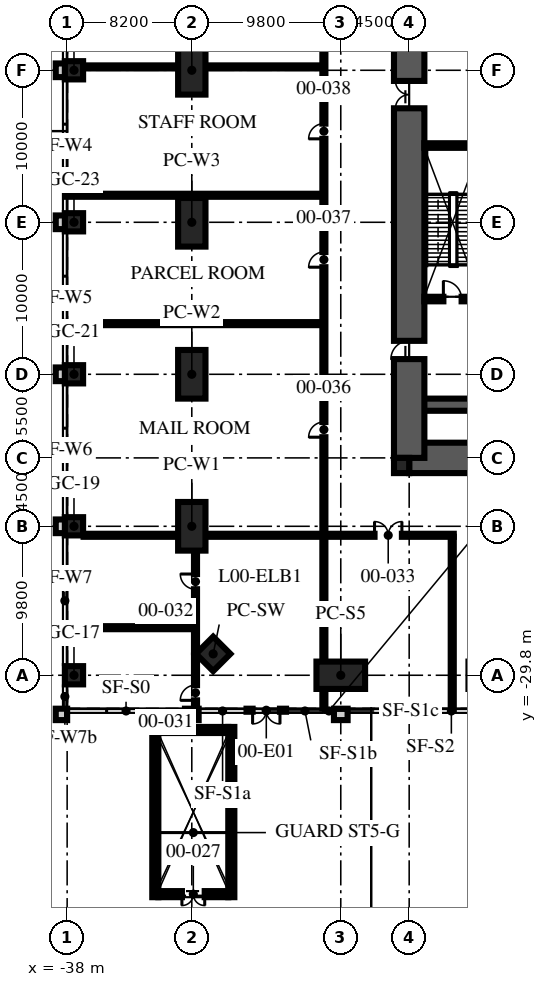
"""IFC4 building model, lengths in metres.
Left out: names, types, materials, properties, quantities, classifications, styles, units other than length and angle.
Written with IfcOpenShell. Run it as: python <this file> out.ifc"""

import sys

from ifc_helpers import new_model, si_unit, direction, frame, frame_2d, origin, origin_2d, place, context, subcontext, project, spatial, rectangle, hollow_rectangle, extrude, element, fill, save


model = new_model("IFC4")
c1 = context("Model", 3, precision=1e-05, world=origin(), true_north=direction((0.0, 1.0)))
c2 = subcontext(c1, "Body", "Model", "MODEL_VIEW")
j1 = project(units=[si_unit("LENGTHUNIT", "METRE"), si_unit("PLANEANGLEUNIT", "RADIAN")], contexts=[c1])
p1 = place(None, origin())
s1 = spatial("IfcSite", under=j1, at=p1, CompositionType="ELEMENT")
p2 = place(p1, origin())
s2 = spatial("IfcBuilding", under=s1, at=p2, CompositionType="ELEMENT")
p3 = place(p2, origin())
s3 = spatial("IfcBuildingStorey", under=s2, at=p3, CompositionType="ELEMENT", Elevation=0.0)
p4 = place(p3, frame((-15.5, -15.5, -0.3), z_axis=(0.0, 0.0, 1.0), x_axis=(1.0, 0.0, 0.0)))
e1 = element("IfcWall", 1, at=p4, inside=s3, PredefinedType="SHEAR", context=c2, shape_type="SweptSolid", body=[
    extrude(rectangle(XDim=31.0, YDim=2.0, at=frame_2d((15.5, 0.0))), origin(), (0.0, 0.0, 1.0), 6.0),
])
p5 = place(p4, frame((10.4, 0.0, 0.3)))
e2 = element("IfcOpeningElement", 2, at=p5, cuts=e1, PredefinedType="OPENING", context=c2, shape_type="SweptSolid", body=[
    extrude(rectangle(XDim=1.1, YDim=2.1, at=frame_2d((0.55, 1.05))), frame((0.0, 1.01, 0.0), z_axis=(0.0, -1.0, 0.0), x_axis=(1.0, 0.0, 0.0)), (0.0, 0.0, 1.0), 2.02),
])
p6 = place(p4, frame((13.5, 0.0, 0.3)))
e3 = element("IfcOpeningElement", 3, at=p6, cuts=e1, PredefinedType="OPENING", context=c2, shape_type="SweptSolid", body=[
    extrude(rectangle(XDim=1.1, YDim=2.1, at=frame_2d((0.55, 1.05))), frame((0.0, 1.01, 0.0), z_axis=(0.0, -1.0, 0.0), x_axis=(1.0, 0.0, 0.0)), (0.0, 0.0, 1.0), 2.02),
])
p7 = place(p4, frame((16.6, 0.0, 0.3)))
e4 = element("IfcOpeningElement", 4, at=p7, cuts=e1, PredefinedType="OPENING", context=c2, shape_type="SweptSolid", body=[
    extrude(rectangle(XDim=1.1, YDim=2.1, at=frame_2d((0.55, 1.05))), frame((0.0, 1.01, 0.0), z_axis=(0.0, -1.0, 0.0), x_axis=(1.0, 0.0, 0.0)), (0.0, 0.0, 1.0), 2.02),
])
p8 = place(p3, frame((-15.5, -12.0, -0.3), z_axis=(0.0, 0.0, 1.0), x_axis=(1.0, 0.0, 0.0)))
e5 = element("IfcWall", 5, at=p8, inside=s3, PredefinedType="SHEAR", context=c2, shape_type="SweptSolid", body=[
    extrude(rectangle(XDim=31.0, YDim=0.8, at=frame_2d((15.5, 0.0))), origin(), (0.0, 0.0, 1.0), 6.0),
])
p9 = place(p3, frame((-15.5, -15.5, -0.3), z_axis=(0.0, 0.0, 1.0), x_axis=(0.0, 1.0, 0.0)))
e6 = element("IfcWall", 6, at=p9, inside=s3, PredefinedType="SHEAR", context=c2, shape_type="SweptSolid", body=[
    extrude(rectangle(XDim=31.0, YDim=2.0, at=frame_2d((15.5, 0.0))), origin(), (0.0, 0.0, 1.0), 6.0),
])
p10 = place(p9, frame((6.5, 0.0, 0.3)))
e7 = element("IfcOpeningElement", 7, at=p10, cuts=e6, PredefinedType="OPENING", context=c2, shape_type="SweptSolid", body=[
    extrude(rectangle(XDim=1.2, YDim=2.1, at=frame_2d((0.6, 1.05))), frame((0.0, 1.01, 0.0), z_axis=(0.0, -1.0, 0.0), x_axis=(1.0, 0.0, 0.0)), (0.0, 0.0, 1.0), 2.02),
])
p11 = place(p9, frame((23.0, 0.0, 0.3)))
e8 = element("IfcOpeningElement", 8, at=p11, cuts=e6, PredefinedType="OPENING", context=c2, shape_type="SweptSolid", body=[
    extrude(rectangle(XDim=1.8, YDim=2.1, at=frame_2d((0.9, 1.05))), frame((0.0, 1.01, 0.0), z_axis=(0.0, -1.0, 0.0), x_axis=(1.0, 0.0, 0.0)), (0.0, 0.0, 1.0), 2.02),
])
p12 = place(p3, frame((-16.0, -16.0, -0.3), z_axis=(0.0, 0.0, 1.0), x_axis=(1.0, 0.0, 0.0)))
e9 = element("IfcColumn", 9, at=p12, inside=s3, PredefinedType="COLUMN", context=c2, shape_type="SweptSolid", body=[
    extrude(rectangle(XDim=1.0, YDim=1.0, at=origin_2d()), origin(), (0.0, 0.0, 1.0), 6.0),
])
for number, where, z_axis, x_axis in (
    (10, (-20.0, -29.8, 0.0), (0.0, 0.0, 1.0), (1.0, 0.0, 0.0)),
    (11, (-29.8, -20.0, 0.0), (0.0, 0.0, 1.0), (0.0, 1.0, 0.0)),
    (12, (-29.8, -10.0, 0.0), (0.0, 0.0, 1.0), (0.0, 1.0, 0.0)),
    (13, (-29.8, 0.0, 0.0), (0.0, 0.0, 1.0), (0.0, 1.0, 0.0)),
    (14, (-29.8, 10.0, 0.0), (0.0, 0.0, 1.0), (0.0, 1.0, 0.0)),
):
    element("IfcColumn", number, at=place(p3, frame(where, z_axis=z_axis, x_axis=x_axis)), inside=s3, PredefinedType="COLUMN", context=c2, shape_type="SweptSolid", body=[
        extrude(hollow_rectangle(XDim=3.2, YDim=1.8, WallThickness=0.2, at=origin_2d()), origin(), (0.0, 0.0, 1.0), 6.0),
    ])
p13 = place(p3, frame((-28.394, -28.394, 0.0), z_axis=(0.0, 0.0, 1.0), x_axis=(0.707106781187, -0.707106781187, 0.0)))
e15 = element("IfcColumn", 15, at=p13, inside=s3, PredefinedType="COLUMN", context=c2, shape_type="SweptSolid", body=[
    extrude(hollow_rectangle(XDim=1.6, YDim=1.6, WallThickness=0.1, at=origin_2d()), origin(), (0.0, 0.0, 1.0), 6.0),
])
for number, where, z_axis, x_axis in (
    (16, (-37.55, -29.8, 0.0), (0.0, 0.0, 1.0), (1.0, 0.0, 0.0)),
    (17, (-37.55, -20.0, 0.0), (0.0, 0.0, 1.0), (1.0, 0.0, 0.0)),
    (18, (-37.55, -10.0, 0.0), (0.0, 0.0, 1.0), (1.0, 0.0, 0.0)),
    (19, (-37.55, 0.0, 0.0), (0.0, 0.0, 1.0), (1.0, 0.0, 0.0)),
    (20, (-37.55, 10.0, 0.0), (0.0, 0.0, 1.0), (1.0, 0.0, 0.0)),
):
    element("IfcColumn", number, at=place(p3, frame(where, z_axis=z_axis, x_axis=x_axis)), inside=s3, PredefinedType="COLUMN", context=c2, shape_type="SweptSolid", body=[
        extrude(rectangle(XDim=1.2, YDim=1.2, at=origin_2d()), origin(), (0.0, 0.0, 1.0), 6.0),
    ])
for number, where, z_axis, x_axis in (
    (21, (-30.25, -32.375, -0.2), (0.0, 0.0, 1.0), (1.0, 0.0, 0.0)),
    (22, (-20.45, -32.375, -0.2), (0.0, 0.0, 1.0), (1.0, 0.0, 0.0)),
):
    element("IfcWall", number, at=place(p3, frame(where, z_axis=z_axis, x_axis=x_axis)), inside=s3, PredefinedType="SOLIDWALL", context=c2, shape_type="SweptSolid", body=[
        extrude(rectangle(XDim=0.9, YDim=0.75, at=frame_2d((0.45, 0.0))), origin(), (0.0, 0.0, 1.0), 6.2),
    ])
p14 = place(p3, frame((-26.2, -32.1, 0.0), z_axis=(0.0, 0.0, 1.0), x_axis=(1.0, 0.0, 0.0)))
e23 = element("IfcWall", 23, at=p14, inside=s3, PredefinedType="ELEMENTEDWALL", context=c2, shape_type="SweptSolid", body=[
    extrude(rectangle(XDim=2.6, YDim=0.2, at=frame_2d((1.3, 0.0))), origin(), (0.0, 0.0, 1.0), 3.2),
])
p15 = place(p14, frame((2.2, 0.0, 0.0), z_axis=(0.0, 0.0, 1.0), x_axis=(-1.0, 0.0, 0.0)))
e24 = element("IfcOpeningElement", 24, at=p15, cuts=e23, PredefinedType="OPENING", context=c2, shape_type="SweptSolid", body=[
    extrude(rectangle(XDim=1.8, YDim=2.7, at=frame_2d((0.9, 1.35))), frame((0.0, 0.11, 0.0), z_axis=(0.0, -1.0, 0.0), x_axis=(1.0, 0.0, 0.0)), (0.0, 0.0, 1.0), 0.22),
])
for number, where, z_axis, x_axis in (
    (25, (-38.375, 10.45, -0.2), (0.0, 0.0, 1.0), (0.0, -1.0, 0.0)),
    (26, (-38.375, 0.45, -0.2), (0.0, 0.0, 1.0), (0.0, -1.0, 0.0)),
    (27, (-38.375, -9.55, -0.2), (0.0, 0.0, 1.0), (0.0, -1.0, 0.0)),
    (28, (-38.375, -19.55, -0.2), (0.0, 0.0, 1.0), (0.0, -1.0, 0.0)),
):
    element("IfcWall", number, at=place(p3, frame(where, z_axis=z_axis, x_axis=x_axis)), inside=s3, PredefinedType="SOLIDWALL", context=c2, shape_type="SweptSolid", body=[
        extrude(rectangle(XDim=0.9, YDim=0.75, at=frame_2d((0.45, 0.0))), origin(), (0.0, 0.0, 1.0), 6.2),
    ])
p16 = place(p3, frame((-38.375, -32.0, -0.2), z_axis=(0.0, 0.0, 1.0), x_axis=(0.0, -1.0, 0.0)))
e29 = element("IfcWall", 29, at=p16, inside=s3, PredefinedType="SOLIDWALL", context=c2, shape_type="SweptSolid", body=[
    extrude(rectangle(XDim=0.75, YDim=0.75, at=frame_2d((0.375, 0.0))), origin(), (0.0, 0.0, 1.0), 6.2),
])
p17 = place(p3, frame((-14.5, -5.05, 0.0), z_axis=(0.0, 0.0, 1.0), x_axis=(1.0, 0.0, 0.0)))
e30 = element("IfcWall", 30, at=p17, inside=s3, PredefinedType="SOLIDWALL", context=c2, shape_type="SweptSolid", body=[
    extrude(rectangle(XDim=5.7, YDim=0.3, at=frame_2d((2.85, 0.0))), origin(), (0.0, 0.0, 1.0), 5.7),
])
p18 = place(p17, frame((1.25, 0.0, 0.0)))
e31 = element("IfcOpeningElement", 31, at=p18, cuts=e30, PredefinedType="OPENING", context=c2, shape_type="SweptSolid", body=[
    extrude(rectangle(XDim=1.2, YDim=2.1, at=frame_2d((0.6, 1.05))), frame((0.0, 0.16, 0.0), z_axis=(0.0, -1.0, 0.0), x_axis=(1.0, 0.0, 0.0)), (0.0, 0.0, 1.0), 0.32),
])
p19 = place(p3, frame((-14.5, 5.05, 0.0), z_axis=(0.0, 0.0, 1.0), x_axis=(1.0, 0.0, 0.0)))
e32 = element("IfcWall", 32, at=p19, inside=s3, PredefinedType="SOLIDWALL", context=c2, shape_type="SweptSolid", body=[
    extrude(rectangle(XDim=3.7, YDim=0.3, at=frame_2d((1.85, 0.0))), origin(), (0.0, 0.0, 1.0), 5.7),
])
for number, where, z_axis, x_axis in (
    (33, (-32.2, -44.4, -0.6), (0.0, 0.0, 1.0), (0.0, 1.0, 0.0)),
    (34, (-27.2, -44.4, -0.6), (0.0, 0.0, 1.0), (0.0, 1.0, 0.0)),
):
    element("IfcWall", number, at=place(p3, frame(where, z_axis=z_axis, x_axis=x_axis)), inside=s3, PredefinedType="SOLIDWALL", context=c2, shape_type="SweptSolid", body=[
        extrude(rectangle(XDim=11.2, YDim=0.4, at=frame_2d((5.6, 0.0))), origin(), (0.0, 0.0, 1.0), 3.8),
    ])
p20 = place(p3, frame((-32.0, -44.2, -0.6), z_axis=(0.0, 0.0, 1.0), x_axis=(1.0, 0.0, 0.0)))
e35 = element("IfcWall", 35, at=p20, inside=s3, PredefinedType="SOLIDWALL", context=c2, shape_type="SweptSolid", body=[
    extrude(rectangle(XDim=4.6, YDim=0.4, at=frame_2d((2.3, 0.0))), origin(), (0.0, 0.0, 1.0), 3.8),
])
p21 = place(p20, frame((3.05, 0.0, 0.6), z_axis=(0.0, 0.0, 1.0), x_axis=(-1.0, 0.0, 0.0)))
e36 = element("IfcOpeningElement", 36, at=p21, cuts=e35, PredefinedType="OPENING", context=c2, shape_type="SweptSolid", body=[
    extrude(rectangle(XDim=1.5, YDim=2.1, at=frame_2d((0.75, 1.05))), frame((0.0, 0.21, 0.0), z_axis=(0.0, -1.0, 0.0), x_axis=(1.0, 0.0, 0.0)), (0.0, 0.0, 1.0), 0.42),
])
p22 = place(p3, frame((-32.0, -33.4, -0.6), z_axis=(0.0, 0.0, 1.0), x_axis=(1.0, 0.0, 0.0)))
e37 = element("IfcWall", 37, at=p22, inside=s3, PredefinedType="SOLIDWALL", context=c2, shape_type="SweptSolid", body=[
    extrude(rectangle(XDim=4.6, YDim=0.4, at=frame_2d((2.3, 0.0))), origin(), (0.0, 0.0, 1.0), 3.8),
])
p23 = place(p3, frame((-12.667, -32.075, 0.0), z_axis=(0.0, 0.0, 1.0), x_axis=(0.0, 1.0, 0.0)))
e38 = element("IfcWall", 38, at=p23, inside=s3, PredefinedType="SOLIDWALL", context=c2, shape_type="SweptSolid", body=[
    extrude(rectangle(XDim=11.384, YDim=0.2, at=frame_2d((5.692, 0.0))), origin(), (0.0, 0.0, 1.0), 4.7),
])
p24 = place(p3, frame((-29.556, -31.98, 0.0), z_axis=(0.0, 0.0, 1.0), x_axis=(0.0, 1.0, 0.0)))
e39 = element("IfcWall", 39, at=p24, inside=s3, PredefinedType="SOLIDWALL", context=c2, shape_type="SweptSolid", body=[
    extrude(rectangle(XDim=3.475, YDim=0.2, at=frame_2d((1.737, 0.0))), origin(), (0.0, 0.0, 1.0), 5.7),
])
p25 = place(p24, frame((0.53, 0.0, 0.0)))
e40 = element("IfcOpeningElement", 40, at=p25, cuts=e39, PredefinedType="OPENING", context=c2, shape_type="SweptSolid", body=[
    extrude(rectangle(XDim=1.0, YDim=2.1, at=frame_2d((0.5, 1.05))), frame((0.0, 0.11, 0.0), z_axis=(0.0, -1.0, 0.0), x_axis=(1.0, 0.0, 0.0)), (0.0, 0.0, 1.0), 0.22),
])
p26 = place(p3, frame((-21.111, -31.98, 0.0), z_axis=(0.0, 0.0, 1.0), x_axis=(0.0, 1.0, 0.0)))
e41 = element("IfcWall", 41, at=p26, inside=s3, PredefinedType="SOLIDWALL", context=c2, shape_type="SweptSolid", body=[
    extrude(rectangle(XDim=1.25, YDim=0.2, at=frame_2d((0.625, 0.0))), origin(), (0.0, 0.0, 1.0), 5.7),
])
p27 = place(p3, frame((-21.111, -28.87, 0.0), z_axis=(0.0, 0.0, 1.0), x_axis=(0.0, 1.0, 0.0)))
e42 = element("IfcWall", 42, at=p27, inside=s3, PredefinedType="SOLIDWALL", context=c2, shape_type="SweptSolid", body=[
    extrude(rectangle(XDim=8.179, YDim=0.2, at=frame_2d((4.089, 0.0))), origin(), (0.0, 0.0, 1.0), 4.5),
])
p28 = place(p3, frame((-29.556, -28.283, 0.0), z_axis=(0.0, 0.0, 1.0), x_axis=(0.0, 1.0, 0.0)))
e43 = element("IfcWall", 43, at=p28, inside=s3, PredefinedType="SOLIDWALL", context=c2, shape_type="SweptSolid", body=[
    extrude(rectangle(XDim=6.653, YDim=0.2, at=frame_2d((3.326, 0.0))), origin(), (0.0, 0.0, 1.0), 4.7),
])
p29 = place(p28, frame((4.143, 0.0, 0.0)))
e44 = element("IfcOpeningElement", 44, at=p29, cuts=e43, PredefinedType="OPENING", context=c2, shape_type="SweptSolid", body=[
    extrude(rectangle(XDim=1.0, YDim=2.1, at=frame_2d((0.5, 1.05))), frame((0.0, 0.11, 0.0), z_axis=(0.0, -1.0, 0.0), x_axis=(1.0, 0.0, 0.0)), (0.0, 0.0, 1.0), 0.22),
])
p30 = place(p3, frame((-38.075, -26.67, 0.0), z_axis=(0.0, 0.0, 1.0), x_axis=(1.0, 0.0, 0.0)))
e45 = element("IfcWall", 45, at=p30, inside=s3, PredefinedType="SOLIDWALL", context=c2, shape_type="SweptSolid", body=[
    extrude(rectangle(XDim=8.419, YDim=0.2, at=frame_2d((4.209, 0.0))), origin(), (0.0, 0.0, 1.0), 4.7),
])
p31 = place(p3, frame((-36.92, -20.591, 0.0), z_axis=(0.0, 0.0, 1.0), x_axis=(1.0, 0.0, 0.0)))
e46 = element("IfcWall", 46, at=p31, inside=s3, PredefinedType="SOLIDWALL", context=c2, shape_type="SweptSolid", body=[
    extrude(rectangle(XDim=6.19, YDim=0.2, at=frame_2d((3.095, 0.0))), origin(), (0.0, 0.0, 1.0), 4.7),
])
p32 = place(p3, frame((-28.87, -20.591, 0.0), z_axis=(0.0, 0.0, 1.0), x_axis=(1.0, 0.0, 0.0)))
e47 = element("IfcWall", 47, at=p32, inside=s3, PredefinedType="SOLIDWALL", context=c2, shape_type="SweptSolid", body=[
    extrude(rectangle(XDim=16.303, YDim=0.2, at=frame_2d((8.151, 0.0))), origin(), (0.0, 0.0, 1.0), 4.5),
])
p33 = place(p32, frame((11.091, 0.0, 0.0)))
e48 = element("IfcOpeningElement", 48, at=p33, cuts=e47, PredefinedType="OPENING", context=c2, shape_type="SweptSolid", body=[
    extrude(rectangle(XDim=1.8, YDim=2.4, at=frame_2d((0.9, 1.2))), frame((0.0, 0.11, 0.0), z_axis=(0.0, -1.0, 0.0), x_axis=(1.0, 0.0, 0.0)), (0.0, 0.0, 1.0), 0.22),
])
p34 = place(p3, frame((-21.111, -20.491, 0.0), z_axis=(0.0, 0.0, 1.0), x_axis=(0.0, 1.0, 0.0)))
e49 = element("IfcWall", 49, at=p34, inside=s3, PredefinedType="SOLIDWALL", context=c2, shape_type="SweptSolid", body=[
    extrude(rectangle(XDim=42.022, YDim=0.2, at=frame_2d((21.011, 0.0))), origin(), (0.0, 0.0, 1.0), 4.5),
])
p35 = place(p34, frame((6.352, 0.0, 0.0)))
e50 = element("IfcOpeningElement", 50, at=p35, cuts=e49, PredefinedType="OPENING", context=c2, shape_type="SweptSolid", body=[
    extrude(rectangle(XDim=1.0, YDim=2.1, at=frame_2d((0.5, 1.05))), frame((0.0, 0.11, 0.0), z_axis=(0.0, -1.0, 0.0), x_axis=(1.0, 0.0, 0.0)), (0.0, 0.0, 1.0), 0.22),
])
p36 = place(p34, frame((17.537, 0.0, 0.0)))
e51 = element("IfcOpeningElement", 51, at=p36, cuts=e49, PredefinedType="OPENING", context=c2, shape_type="SweptSolid", body=[
    extrude(rectangle(XDim=1.0, YDim=2.1, at=frame_2d((0.5, 1.05))), frame((0.0, 0.11, 0.0), z_axis=(0.0, -1.0, 0.0), x_axis=(1.0, 0.0, 0.0)), (0.0, 0.0, 1.0), 0.22),
])
p37 = place(p34, frame((25.981, 0.0, 0.0)))
e52 = element("IfcOpeningElement", 52, at=p37, cuts=e49, PredefinedType="OPENING", context=c2, shape_type="SweptSolid", body=[
    extrude(rectangle(XDim=1.0, YDim=2.1, at=frame_2d((0.5, 1.05))), frame((0.0, 0.11, 0.0), z_axis=(0.0, -1.0, 0.0), x_axis=(1.0, 0.0, 0.0)), (0.0, 0.0, 1.0), 0.22),
])
p38 = place(p34, frame((35.907, 0.0, 0.0)))
e53 = element("IfcOpeningElement", 53, at=p38, cuts=e49, PredefinedType="OPENING", context=c2, shape_type="SweptSolid", body=[
    extrude(rectangle(XDim=1.0, YDim=2.1, at=frame_2d((0.5, 1.05))), frame((0.0, 0.11, 0.0), z_axis=(0.0, -1.0, 0.0), x_axis=(1.0, 0.0, 0.0)), (0.0, 0.0, 1.0), 0.22),
])
for number, where, z_axis, x_axis in (
    (54, (-38.075, -6.667, 0.0), (0.0, 0.0, 1.0), (1.0, 0.0, 0.0)),
    (55, (-38.075, 1.778, 0.0), (0.0, 0.0, 1.0), (1.0, 0.0, 0.0)),
):
    element("IfcWall", number, at=place(p3, frame(where, z_axis=z_axis, x_axis=x_axis)), inside=s3, PredefinedType="SOLIDWALL", context=c2, shape_type="SweptSolid", body=[
        extrude(rectangle(XDim=16.864, YDim=0.2, at=frame_2d((8.432, 0.0))), origin(), (0.0, 0.0, 1.0), 4.7),
    ])
p39 = place(p3, frame((-36.92, 10.222, 0.0), z_axis=(0.0, 0.0, 1.0), x_axis=(1.0, 0.0, 0.0)))
e56 = element("IfcWall", 56, at=p39, inside=s3, PredefinedType="SOLIDWALL", context=c2, shape_type="SweptSolid", body=[
    extrude(rectangle(XDim=6.19, YDim=0.2, at=frame_2d((3.095, 0.0))), origin(), (0.0, 0.0, 1.0), 4.7),
])
p40 = place(p3, frame((-28.87, 10.222, 0.0), z_axis=(0.0, 0.0, 1.0), x_axis=(1.0, 0.0, 0.0)))
e57 = element("IfcWall", 57, at=p40, inside=s3, PredefinedType="SOLIDWALL", context=c2, shape_type="SweptSolid", body=[
    extrude(rectangle(XDim=7.659, YDim=0.2, at=frame_2d((3.83, 0.0))), origin(), (0.0, 0.0, 1.0), 4.5),
])
p41 = place(p15, origin())
e58 = element("IfcDoor", 58, at=p41, inside=s3, OperationType="SINGLE_SWING_LEFT", PredefinedType="DOOR", context=c2, shape_type="SweptSolid", body=[
    extrude(rectangle(XDim=1.8, YDim=2.7, at=frame_2d((0.9, 1.35))), frame((0.0, 0.025, 0.0), z_axis=(0.0, -1.0, 0.0), x_axis=(1.0, 0.0, 0.0)), (0.0, 0.0, 1.0), 0.05),
])
fill(e24, e58)
p42 = place(p18, origin())
e59 = element("IfcDoor", 59, at=p42, inside=s3, OperationType="SINGLE_SWING_LEFT", PredefinedType="DOOR", context=c2, shape_type="SweptSolid", body=[
    extrude(rectangle(XDim=1.2, YDim=2.1, at=frame_2d((0.6, 1.05))), frame((0.0, 0.025, 0.0), z_axis=(0.0, -1.0, 0.0), x_axis=(1.0, 0.0, 0.0)), (0.0, 0.0, 1.0), 0.05),
])
fill(e31, e59)
p43 = place(p10, origin())
e60 = element("IfcDoor", 60, at=p43, inside=s3, OperationType="SINGLE_SWING_LEFT", PredefinedType="DOOR", context=c2, shape_type="SweptSolid", body=[
    extrude(rectangle(XDim=1.2, YDim=2.1, at=frame_2d((0.6, 1.05))), frame((0.0, 0.025, 0.0), z_axis=(0.0, -1.0, 0.0), x_axis=(1.0, 0.0, 0.0)), (0.0, 0.0, 1.0), 0.05),
])
fill(e7, e60)
p44 = place(p11, origin())
e61 = element("IfcDoor", 61, at=p44, inside=s3, OperationType="DOUBLE_DOOR_SINGLE_SWING", PredefinedType="DOOR", context=c2, shape_type="SweptSolid", body=[
    extrude(rectangle(XDim=1.8, YDim=2.1, at=frame_2d((0.9, 1.05))), frame((0.0, 0.025, 0.0), z_axis=(0.0, -1.0, 0.0), x_axis=(1.0, 0.0, 0.0)), (0.0, 0.0, 1.0), 0.05),
])
fill(e8, e61)
p45 = place(p21, origin())
e62 = element("IfcDoor", 62, at=p45, inside=s3, OperationType="DOUBLE_DOOR_SINGLE_SWING", PredefinedType="DOOR", context=c2, shape_type="SweptSolid", body=[
    extrude(rectangle(XDim=1.5, YDim=2.1, at=frame_2d((0.75, 1.05))), frame((0.0, 0.025, 0.0), z_axis=(0.0, -1.0, 0.0), x_axis=(1.0, 0.0, 0.0)), (0.0, 0.0, 1.0), 0.05),
])
fill(e36, e62)
p46 = place(p25, origin())
e63 = element("IfcDoor", 63, at=p46, inside=s3, OperationType="SINGLE_SWING_LEFT", PredefinedType="DOOR", context=c2, shape_type="SweptSolid", body=[
    extrude(rectangle(XDim=1.0, YDim=2.1, at=frame_2d((0.5, 1.05))), frame((0.0, 0.025, 0.0), z_axis=(0.0, -1.0, 0.0), x_axis=(1.0, 0.0, 0.0)), (0.0, 0.0, 1.0), 0.05),
])
fill(e40, e63)
p47 = place(p29, origin())
e64 = element("IfcDoor", 64, at=p47, inside=s3, OperationType="SINGLE_SWING_RIGHT", PredefinedType="DOOR", context=c2, shape_type="SweptSolid", body=[
    extrude(rectangle(XDim=1.0, YDim=2.1, at=frame_2d((0.5, 1.05))), frame((0.0, 0.025, 0.0), z_axis=(0.0, -1.0, 0.0), x_axis=(1.0, 0.0, 0.0)), (0.0, 0.0, 1.0), 0.05),
])
fill(e44, e64)
p48 = place(p33, origin())
e65 = element("IfcDoor", 65, at=p48, inside=s3, OperationType="DOUBLE_DOOR_SINGLE_SWING", PredefinedType="DOOR", context=c2, shape_type="SweptSolid", body=[
    extrude(rectangle(XDim=1.8, YDim=2.4, at=frame_2d((0.9, 1.2))), frame((0.0, 0.025, 0.0), z_axis=(0.0, -1.0, 0.0), x_axis=(1.0, 0.0, 0.0)), (0.0, 0.0, 1.0), 0.05),
])
fill(e48, e65)
p49 = place(p35, origin())
e66 = element("IfcDoor", 66, at=p49, inside=s3, OperationType="SINGLE_SWING_LEFT", PredefinedType="DOOR", context=c2, shape_type="SweptSolid", body=[
    extrude(rectangle(XDim=1.0, YDim=2.1, at=frame_2d((0.5, 1.05))), frame((0.0, 0.025, 0.0), z_axis=(0.0, -1.0, 0.0), x_axis=(1.0, 0.0, 0.0)), (0.0, 0.0, 1.0), 0.05),
])
fill(e50, e66)
p50 = place(p36, origin())
e67 = element("IfcDoor", 67, at=p50, inside=s3, OperationType="SINGLE_SWING_LEFT", PredefinedType="DOOR", context=c2, shape_type="SweptSolid", body=[
    extrude(rectangle(XDim=1.0, YDim=2.1, at=frame_2d((0.5, 1.05))), frame((0.0, 0.025, 0.0), z_axis=(0.0, -1.0, 0.0), x_axis=(1.0, 0.0, 0.0)), (0.0, 0.0, 1.0), 0.05),
])
fill(e51, e67)
p51 = place(p37, origin())
e68 = element("IfcDoor", 68, at=p51, inside=s3, OperationType="SINGLE_SWING_LEFT", PredefinedType="DOOR", context=c2, shape_type="SweptSolid", body=[
    extrude(rectangle(XDim=1.0, YDim=2.1, at=frame_2d((0.5, 1.05))), frame((0.0, 0.025, 0.0), z_axis=(0.0, -1.0, 0.0), x_axis=(1.0, 0.0, 0.0)), (0.0, 0.0, 1.0), 0.05),
])
fill(e52, e68)
save(model, sys.argv[1])
